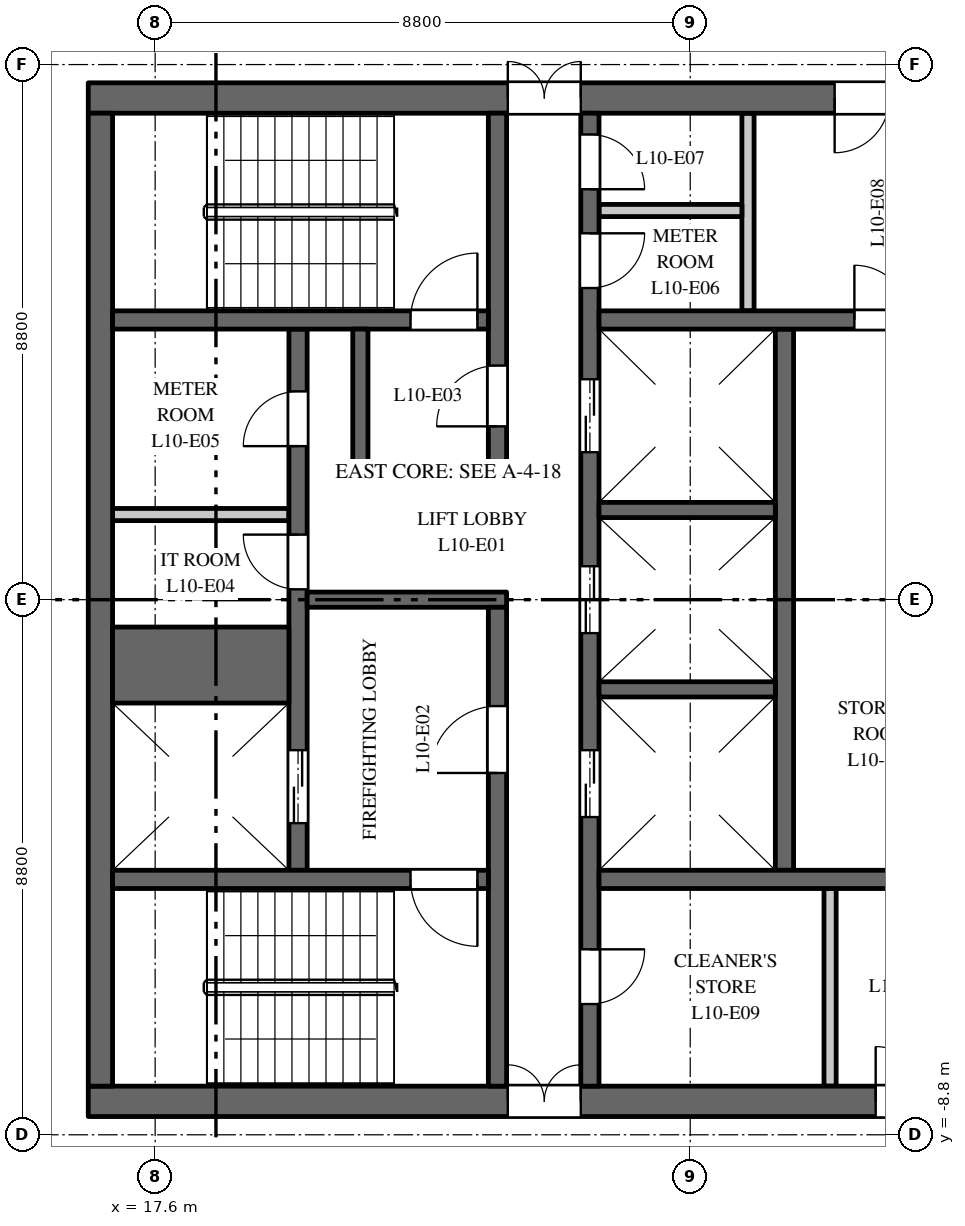
"""IFC4 building model, lengths in metres.
Left out: names, types, materials, properties, quantities, classifications, styles, units other than length and angle.
Written with IfcOpenShell. Run it as: python <this file> out.ifc"""

import sys

from ifc_helpers import new_model, si_unit, direction, frame, frame_2d, origin, place, context, subcontext, project, spatial, rectangle, extrude, element, fill, save


model = new_model("IFC4")
c1 = context("Model", 3, precision=1e-05, world=origin(), true_north=direction((0.0, 1.0)))
c2 = subcontext(c1, "Body", "Model", "MODEL_VIEW")
j1 = project(units=[si_unit("LENGTHUNIT", "METRE"), si_unit("PLANEANGLEUNIT", "RADIAN")], contexts=[c1])
p1 = place(None, origin())
s1 = spatial("IfcSite", under=j1, at=p1, CompositionType="ELEMENT")
p2 = place(p1, origin())
s2 = spatial("IfcBuilding", under=s1, at=p2, CompositionType="ELEMENT")
p3 = place(p2, frame((0.0, 0.0, 50.5)))
s3 = spatial("IfcBuildingStorey", under=s2, at=p3, CompositionType="ELEMENT", Elevation=50.5)
p4 = place(p3, frame((16.5, 8.25, 0.0), z_axis=(0.0, 0.0, 1.0), x_axis=(1.0, 0.0, 0.0)))
e1 = element("IfcWall", 1, at=p4, inside=s3, PredefinedType="SHEAR", context=c2, shape_type="SweptSolid", body=[
    extrude(rectangle(XDim=15.0, YDim=0.5, at=frame_2d((7.5, 0.0))), origin(), (0.0, 0.0, 1.0), 3.7),
])
p5 = place(p4, frame((6.9, 0.0, 0.0)))
e2 = element("IfcOpeningElement", 2, at=p5, cuts=e1, PredefinedType="OPENING", context=c2, shape_type="SweptSolid", body=[
    extrude(rectangle(XDim=1.2, YDim=2.1, at=frame_2d((0.6, 1.05))), frame((0.0, 0.26, 0.0), z_axis=(0.0, -1.0, 0.0), x_axis=(1.0, 0.0, 0.0)), (0.0, 0.0, 1.0), 0.52),
])
p6 = place(p4, frame((12.275, 0.0, 0.0)))
e3 = element("IfcOpeningElement", 3, at=p6, cuts=e1, PredefinedType="OPENING", context=c2, shape_type="SweptSolid", body=[
    extrude(rectangle(XDim=0.9, YDim=2.1, at=frame_2d((0.45, 1.05))), frame((0.0, 0.26, 0.0), z_axis=(0.0, -1.0, 0.0), x_axis=(1.0, 0.0, 0.0)), (0.0, 0.0, 1.0), 0.52),
])
p7 = place(p3, frame((16.5, -8.25, 0.0), z_axis=(0.0, 0.0, 1.0), x_axis=(1.0, 0.0, 0.0)))
e4 = element("IfcWall", 4, at=p7, inside=s3, PredefinedType="SHEAR", context=c2, shape_type="SweptSolid", body=[
    extrude(rectangle(XDim=15.0, YDim=0.5, at=frame_2d((7.5, 0.0))), origin(), (0.0, 0.0, 1.0), 3.7),
])
p8 = place(p7, frame((6.9, 0.0, 0.0)))
e5 = element("IfcOpeningElement", 5, at=p8, cuts=e4, PredefinedType="OPENING", context=c2, shape_type="SweptSolid", body=[
    extrude(rectangle(XDim=1.2, YDim=2.1, at=frame_2d((0.6, 1.05))), frame((0.0, 0.26, 0.0), z_axis=(0.0, -1.0, 0.0), x_axis=(1.0, 0.0, 0.0)), (0.0, 0.0, 1.0), 0.52),
])
p9 = place(p7, frame((12.95, 0.0, 0.0)))
e6 = element("IfcOpeningElement", 6, at=p9, cuts=e4, PredefinedType="OPENING", context=c2, shape_type="SweptSolid", body=[
    extrude(rectangle(XDim=0.9, YDim=2.1, at=frame_2d((0.45, 1.05))), frame((0.0, 0.26, 0.0), z_axis=(0.0, -1.0, 0.0), x_axis=(1.0, 0.0, 0.0)), (0.0, 0.0, 1.0), 0.52),
])
p10 = place(p3, frame((16.9, 1.4, 0.0), z_axis=(0.0, 0.0, 1.0), x_axis=(1.0, 0.0, 0.0)))
e7 = element("IfcWall", 7, at=p10, inside=s3, PredefinedType="PARTITIONING", context=c2, shape_type="SweptSolid", body=[
    extrude(rectangle(XDim=2.9, YDim=0.2, at=frame_2d((1.45, 0.0))), origin(), (0.0, 0.0, 1.0), 3.7),
])
p11 = place(p3, frame((27.95, -4.45, 0.0), z_axis=(0.0, 0.0, 1.0), x_axis=(0.0, 1.0, 0.0)))
e8 = element("IfcWall", 8, at=p11, inside=s3, PredefinedType="SHEAR", context=c2, shape_type="SweptSolid", body=[
    extrude(rectangle(XDim=8.9, YDim=0.3, at=frame_2d((4.45, 0.0))), origin(), (0.0, 0.0, 1.0), 3.7),
])
p12 = place(p3, frame((19.95, -4.45, 0.0), z_axis=(0.0, 0.0, 1.0), x_axis=(0.0, 1.0, 0.0)))
e9 = element("IfcWall", 9, at=p12, inside=s3, PredefinedType="SHEAR", context=c2, shape_type="SweptSolid", body=[
    extrude(rectangle(XDim=8.9, YDim=0.3, at=frame_2d((4.45, 0.0))), origin(), (0.0, 0.0, 1.0), 3.7),
])
p13 = place(p12, frame((0.775, 0.0, 0.0)))
e10 = element("IfcOpeningElement", 10, at=p13, cuts=e9, PredefinedType="OPENING", context=c2, shape_type="SweptSolid", body=[
    extrude(rectangle(XDim=1.2, YDim=2.1, at=frame_2d((0.6, 1.05))), frame((0.0, 0.16, 0.0), z_axis=(0.0, -1.0, 0.0), x_axis=(1.0, 0.0, 0.0)), (0.0, 0.0, 1.0), 0.32),
])
p14 = place(p12, frame((4.62, 0.0, 0.0)))
e11 = element("IfcOpeningElement", 11, at=p14, cuts=e9, PredefinedType="OPENING", context=c2, shape_type="SweptSolid", body=[
    extrude(rectangle(XDim=0.9, YDim=2.1, at=frame_2d((0.45, 1.05))), frame((0.0, 0.16, 0.0), z_axis=(0.0, -1.0, 0.0), x_axis=(1.0, 0.0, 0.0)), (0.0, 0.0, 1.0), 0.32),
])
p15 = place(p12, frame((6.975, 0.0, 0.0)))
e12 = element("IfcOpeningElement", 12, at=p15, cuts=e9, PredefinedType="OPENING", context=c2, shape_type="SweptSolid", body=[
    extrude(rectangle(XDim=0.9, YDim=2.1, at=frame_2d((0.45, 1.05))), frame((0.0, 0.16, 0.0), z_axis=(0.0, -1.0, 0.0), x_axis=(1.0, 0.0, 0.0)), (0.0, 0.0, 1.0), 0.32),
])
p16 = place(p3, frame((24.75, -8.0, 0.0), z_axis=(0.0, 0.0, 1.0), x_axis=(0.0, 1.0, 0.0)))
e13 = element("IfcWall", 13, at=p16, inside=s3, PredefinedType="SHEAR", context=c2, shape_type="SweptSolid", body=[
    extrude(rectangle(XDim=16.0, YDim=0.3, at=frame_2d((8.0, 0.0))), origin(), (0.0, 0.0, 1.0), 3.7),
])
p17 = place(p16, frame((4.425, 0.0, 0.0)))
e14 = element("IfcOpeningElement", 14, at=p17, cuts=e13, PredefinedType="OPENING", context=c2, shape_type="SweptSolid", body=[
    extrude(rectangle(XDim=1.1, YDim=2.1, at=frame_2d((0.55, 1.05))), frame((0.0, 0.16, 0.0), z_axis=(0.0, -1.0, 0.0), x_axis=(1.0, 0.0, 0.0)), (0.0, 0.0, 1.0), 0.32),
])
p18 = place(p16, frame((7.45, 0.0, 0.0)))
e15 = element("IfcOpeningElement", 15, at=p18, cuts=e13, PredefinedType="OPENING", context=c2, shape_type="SweptSolid", body=[
    extrude(rectangle(XDim=1.1, YDim=2.1, at=frame_2d((0.55, 1.05))), frame((0.0, 0.16, 0.0), z_axis=(0.0, -1.0, 0.0), x_axis=(1.0, 0.0, 0.0)), (0.0, 0.0, 1.0), 0.32),
])
p19 = place(p16, frame((10.425, 0.0, 0.0)))
e16 = element("IfcOpeningElement", 16, at=p19, cuts=e13, PredefinedType="OPENING", context=c2, shape_type="SweptSolid", body=[
    extrude(rectangle(XDim=1.2, YDim=2.1, at=frame_2d((0.6, 1.05))), frame((0.0, 0.16, 0.0), z_axis=(0.0, -1.0, 0.0), x_axis=(1.0, 0.0, 0.0)), (0.0, 0.0, 1.0), 0.32),
])
p20 = place(p16, frame((13.125, 0.0, 0.0)))
e17 = element("IfcOpeningElement", 17, at=p20, cuts=e13, PredefinedType="OPENING", context=c2, shape_type="SweptSolid", body=[
    extrude(rectangle(XDim=0.9, YDim=2.1, at=frame_2d((0.45, 1.05))), frame((0.0, 0.16, 0.0), z_axis=(0.0, -1.0, 0.0), x_axis=(1.0, 0.0, 0.0)), (0.0, 0.0, 1.0), 0.32),
])
p21 = place(p16, frame((14.75, 0.0, 0.0)))
e18 = element("IfcOpeningElement", 18, at=p21, cuts=e13, PredefinedType="OPENING", context=c2, shape_type="SweptSolid", body=[
    extrude(rectangle(XDim=0.9, YDim=2.1, at=frame_2d((0.45, 1.05))), frame((0.0, 0.16, 0.0), z_axis=(0.0, -1.0, 0.0), x_axis=(1.0, 0.0, 0.0)), (0.0, 0.0, 1.0), 0.32),
])
p22 = place(p16, frame((1.35, 0.0, 0.0)))
e19 = element("IfcOpeningElement", 19, at=p22, cuts=e13, PredefinedType="OPENING", context=c2, shape_type="SweptSolid", body=[
    extrude(rectangle(XDim=0.9, YDim=2.1, at=frame_2d((0.45, 1.05))), frame((0.0, 0.16, 0.0), z_axis=(0.0, -1.0, 0.0), x_axis=(1.0, 0.0, 0.0)), (0.0, 0.0, 1.0), 0.32),
])
p23 = place(p3, frame((20.1, 0.0, 0.0), z_axis=(0.0, 0.0, 1.0), x_axis=(1.0, 0.0, 0.0)))
e20 = element("IfcWall", 20, at=p23, inside=s3, PredefinedType="SHEAR", context=c2, shape_type="SweptSolid", body=[
    extrude(rectangle(XDim=3.28, YDim=0.25, at=frame_2d((1.64, 0.0))), origin(), (0.0, 0.0, 1.0), 3.7),
])
p24 = place(p3, frame((16.7, -8.0, 0.0), z_axis=(0.0, 0.0, 1.0), x_axis=(0.0, 1.0, 0.0)))
e21 = element("IfcWall", 21, at=p24, inside=s3, PredefinedType="SHEAR", context=c2, shape_type="SweptSolid", body=[
    extrude(rectangle(XDim=16.0, YDim=0.4, at=frame_2d((8.0, 0.0))), origin(), (0.0, 0.0, 1.0), 3.7),
])
p25 = place(p3, frame((24.9, 4.6, 0.0), z_axis=(0.0, 0.0, 1.0), x_axis=(1.0, 0.0, 0.0)))
e22 = element("IfcWall", 22, at=p25, inside=s3, PredefinedType="SHEAR", context=c2, shape_type="SweptSolid", body=[
    extrude(rectangle(XDim=6.1, YDim=0.3, at=frame_2d((3.05, 0.0))), origin(), (0.0, 0.0, 1.0), 3.7),
])
p26 = place(p25, frame((4.2, 0.0, 0.0)))
e23 = element("IfcOpeningElement", 23, at=p26, cuts=e22, PredefinedType="OPENING", context=c2, shape_type="SweptSolid", body=[
    extrude(rectangle(XDim=0.9, YDim=2.1, at=frame_2d((0.45, 1.05))), frame((0.0, 0.16, 0.0), z_axis=(0.0, -1.0, 0.0), x_axis=(1.0, 0.0, 0.0)), (0.0, 0.0, 1.0), 0.32),
])
for number, where, z_axis, x_axis in (
    (24, (27.35, 4.75, 0.0), (0.0, 0.0, 1.0), (0.0, 1.0, 0.0)),
    (25, (28.7, -8.0, 0.0), (0.0, 0.0, 1.0), (0.0, 1.0, 0.0)),
):
    element("IfcWall", number, at=place(p3, frame(where, z_axis=z_axis, x_axis=x_axis)), inside=s3, PredefinedType="PARTITIONING", context=c2, shape_type="SweptSolid", body=[
        extrude(rectangle(XDim=3.25, YDim=0.2, at=frame_2d((1.625, 0.0))), origin(), (0.0, 0.0, 1.0), 3.7),
    ])
p27 = place(p3, frame((24.9, 6.4, 0.0), z_axis=(0.0, 0.0, 1.0), x_axis=(1.0, 0.0, 0.0)))
e26 = element("IfcWall", 26, at=p27, inside=s3, PredefinedType="PARTITIONING", context=c2, shape_type="SweptSolid", body=[
    extrude(rectangle(XDim=2.35, YDim=0.2, at=frame_2d((1.175, 0.0))), origin(), (0.0, 0.0, 1.0), 3.7),
])
p28 = place(p3, frame((24.9, -4.6, 0.0), z_axis=(0.0, 0.0, 1.0), x_axis=(1.0, 0.0, 0.0)))
e27 = element("IfcWall", 27, at=p28, inside=s3, PredefinedType="SHEAR", context=c2, shape_type="SweptSolid", body=[
    extrude(rectangle(XDim=6.1, YDim=0.3, at=frame_2d((3.05, 0.0))), origin(), (0.0, 0.0, 1.0), 3.7),
])
p29 = place(p3, frame((16.9, -1.075, 0.0), z_axis=(0.0, 0.0, 1.0), x_axis=(1.0, 0.0, 0.0)))
e28 = element("IfcWall", 28, at=p29, inside=s3, PredefinedType="SHEAR", context=c2, shape_type="SweptSolid", body=[
    extrude(rectangle(XDim=2.9, YDim=1.25, at=frame_2d((1.45, 0.0))), origin(), (0.0, 0.0, 1.0), 3.7),
])
for number, where, z_axis, x_axis in (
    (29, (24.9, -1.475, 0.0), (0.0, 0.0, 1.0), (1.0, 0.0, 0.0)),
    (30, (24.9, 1.475, 0.0), (0.0, 0.0, 1.0), (1.0, 0.0, 0.0)),
):
    element("IfcWall", number, at=place(p3, frame(where, z_axis=z_axis, x_axis=x_axis)), inside=s3, PredefinedType="SHEAR", context=c2, shape_type="SweptSolid", body=[
        extrude(rectangle(XDim=2.9, YDim=0.25, at=frame_2d((1.45, 0.0))), origin(), (0.0, 0.0, 1.0), 3.7),
    ])
p30 = place(p3, frame((23.23, 2.25, 0.0), z_axis=(0.0, 0.0, 1.0), x_axis=(0.0, 1.0, 0.0)))
e31 = element("IfcWall", 31, at=p30, inside=s3, PredefinedType="SHEAR", context=c2, shape_type="SweptSolid", body=[
    extrude(rectangle(XDim=5.75, YDim=0.3, at=frame_2d((2.875, 0.0))), origin(), (0.0, 0.0, 1.0), 3.7),
])
p31 = place(p30, frame((0.6, 0.0, 0.0)))
e32 = element("IfcOpeningElement", 32, at=p31, cuts=e31, PredefinedType="OPENING", context=c2, shape_type="SweptSolid", body=[
    extrude(rectangle(XDim=1.0, YDim=2.1, at=frame_2d((0.5, 1.05))), frame((0.0, 0.16, 0.0), z_axis=(0.0, -1.0, 0.0), x_axis=(1.0, 0.0, 0.0)), (0.0, 0.0, 1.0), 0.32),
])
p32 = place(p3, frame((23.23, -8.0, 0.0), z_axis=(0.0, 0.0, 1.0), x_axis=(0.0, 1.0, 0.0)))
e33 = element("IfcWall", 33, at=p32, inside=s3, PredefinedType="SHEAR", context=c2, shape_type="SweptSolid", body=[
    extrude(rectangle(XDim=7.875, YDim=0.3, at=frame_2d((3.938, 0.0))), origin(), (0.0, 0.0, 1.0), 3.7),
])
p33 = place(p32, frame((5.15, 0.0, 0.0)))
e34 = element("IfcOpeningElement", 34, at=p33, cuts=e33, PredefinedType="OPENING", context=c2, shape_type="SweptSolid", body=[
    extrude(rectangle(XDim=1.1, YDim=2.1, at=frame_2d((0.55, 1.05))), frame((0.0, 0.16, 0.0), z_axis=(0.0, -1.0, 0.0), x_axis=(1.0, 0.0, 0.0)), (0.0, 0.0, 1.0), 0.32),
])
p34 = place(p3, frame((16.9, 4.6, 0.0), z_axis=(0.0, 0.0, 1.0), x_axis=(1.0, 0.0, 0.0)))
e35 = element("IfcWall", 35, at=p34, inside=s3, PredefinedType="SHEAR", context=c2, shape_type="SweptSolid", body=[
    extrude(rectangle(XDim=6.18, YDim=0.3, at=frame_2d((3.09, 0.0))), origin(), (0.0, 0.0, 1.0), 3.7),
])
p35 = place(p34, frame((4.9, 0.0, 0.0)))
e36 = element("IfcOpeningElement", 36, at=p35, cuts=e35, PredefinedType="OPENING", context=c2, shape_type="SweptSolid", body=[
    extrude(rectangle(XDim=1.1, YDim=2.1, at=frame_2d((0.55, 1.05))), frame((0.0, 0.16, 0.0), z_axis=(0.0, -1.0, 0.0), x_axis=(1.0, 0.0, 0.0)), (0.0, 0.0, 1.0), 0.32),
])
p36 = place(p3, frame((16.9, -4.6, 0.0), z_axis=(0.0, 0.0, 1.0), x_axis=(1.0, 0.0, 0.0)))
e37 = element("IfcWall", 37, at=p36, inside=s3, PredefinedType="SHEAR", context=c2, shape_type="SweptSolid", body=[
    extrude(rectangle(XDim=6.18, YDim=0.3, at=frame_2d((3.09, 0.0))), origin(), (0.0, 0.0, 1.0), 3.7),
])
p37 = place(p36, frame((4.9, 0.0, 0.0)))
e38 = element("IfcOpeningElement", 38, at=p37, cuts=e37, PredefinedType="OPENING", context=c2, shape_type="SweptSolid", body=[
    extrude(rectangle(XDim=1.1, YDim=2.1, at=frame_2d((0.55, 1.05))), frame((0.0, 0.16, 0.0), z_axis=(0.0, -1.0, 0.0), x_axis=(1.0, 0.0, 0.0)), (0.0, 0.0, 1.0), 0.32),
])
p38 = place(p3, frame((20.85, 2.125, 0.0), z_axis=(0.0, 0.0, 1.0), x_axis=(1.0, 0.0, 0.0)))
e39 = element("IfcWall", 39, at=p38, inside=s3, PredefinedType="SHEAR", context=c2, shape_type="SweptSolid", body=[
    extrude(rectangle(XDim=2.53, YDim=0.25, at=frame_2d((1.265, 0.0))), origin(), (0.0, 0.0, 1.0), 3.7),
])
p39 = place(p3, frame((20.975, 2.25, 0.0), z_axis=(0.0, 0.0, 1.0), x_axis=(0.0, 1.0, 0.0)))
e40 = element("IfcWall", 40, at=p39, inside=s3, PredefinedType="SHEAR", context=c2, shape_type="SweptSolid", body=[
    extrude(rectangle(XDim=2.2, YDim=0.25, at=frame_2d((1.1, 0.0))), origin(), (0.0, 0.0, 1.0), 3.7),
])
p40 = place(p13, origin())
e41 = element("IfcDoor", 41, at=p40, inside=s3, OperationType="DOUBLE_DOOR_SLIDING", PredefinedType="DOOR", context=c2, shape_type="SweptSolid", body=[
    extrude(rectangle(XDim=1.2, YDim=2.1, at=frame_2d((0.6, 1.05))), frame((0.0, 0.025, 0.0), z_axis=(0.0, -1.0, 0.0), x_axis=(1.0, 0.0, 0.0)), (0.0, 0.0, 1.0), 0.05),
])
fill(e10, e41)
p41 = place(p17, origin())
e42 = element("IfcDoor", 42, at=p41, inside=s3, OperationType="DOUBLE_DOOR_SLIDING", PredefinedType="DOOR", context=c2, shape_type="SweptSolid", body=[
    extrude(rectangle(XDim=1.1, YDim=2.1, at=frame_2d((0.55, 1.05))), frame((0.0, 0.025, 0.0), z_axis=(0.0, -1.0, 0.0), x_axis=(1.0, 0.0, 0.0)), (0.0, 0.0, 1.0), 0.05),
])
fill(e14, e42)
p42 = place(p18, origin())
e43 = element("IfcDoor", 43, at=p42, inside=s3, OperationType="DOUBLE_DOOR_SLIDING", PredefinedType="DOOR", context=c2, shape_type="SweptSolid", body=[
    extrude(rectangle(XDim=1.1, YDim=2.1, at=frame_2d((0.55, 1.05))), frame((0.0, 0.025, 0.0), z_axis=(0.0, -1.0, 0.0), x_axis=(1.0, 0.0, 0.0)), (0.0, 0.0, 1.0), 0.05),
])
fill(e15, e43)
p43 = place(p19, origin())
e44 = element("IfcDoor", 44, at=p43, inside=s3, OperationType="DOUBLE_DOOR_SLIDING", PredefinedType="DOOR", context=c2, shape_type="SweptSolid", body=[
    extrude(rectangle(XDim=1.2, YDim=2.1, at=frame_2d((0.6, 1.05))), frame((0.0, 0.025, 0.0), z_axis=(0.0, -1.0, 0.0), x_axis=(1.0, 0.0, 0.0)), (0.0, 0.0, 1.0), 0.05),
])
fill(e16, e44)
p44 = place(p35, origin())
e45 = element("IfcDoor", 45, at=p44, inside=s3, OperationType="SINGLE_SWING_LEFT", PredefinedType="DOOR", context=c2, shape_type="SweptSolid", body=[
    extrude(rectangle(XDim=1.1, YDim=2.1, at=frame_2d((0.55, 1.05))), frame((0.0, 0.025, 0.0), z_axis=(0.0, -1.0, 0.0), x_axis=(1.0, 0.0, 0.0)), (0.0, 0.0, 1.0), 0.05),
])
fill(e36, e45)
p45 = place(p37, origin())
e46 = element("IfcDoor", 46, at=p45, inside=s3, OperationType="SINGLE_SWING_RIGHT", PredefinedType="DOOR", context=c2, shape_type="SweptSolid", body=[
    extrude(rectangle(XDim=1.1, YDim=2.1, at=frame_2d((0.55, 1.05))), frame((0.0, 0.025, 0.0), z_axis=(0.0, -1.0, 0.0), x_axis=(1.0, 0.0, 0.0)), (0.0, 0.0, 1.0), 0.05),
])
fill(e38, e46)
p46 = place(p33, origin())
e47 = element("IfcDoor", 47, at=p46, inside=s3, OperationType="SINGLE_SWING_RIGHT", PredefinedType="DOOR", context=c2, shape_type="SweptSolid", body=[
    extrude(rectangle(XDim=1.1, YDim=2.1, at=frame_2d((0.55, 1.05))), frame((0.0, 0.025, 0.0), z_axis=(0.0, -1.0, 0.0), x_axis=(1.0, 0.0, 0.0)), (0.0, 0.0, 1.0), 0.05),
])
fill(e34, e47)
p47 = place(p31, origin())
e48 = element("IfcDoor", 48, at=p47, inside=s3, OperationType="SINGLE_SWING_RIGHT", PredefinedType="DOOR", context=c2, shape_type="SweptSolid", body=[
    extrude(rectangle(XDim=1.0, YDim=2.1, at=frame_2d((0.5, 1.05))), frame((0.0, 0.025, 0.0), z_axis=(0.0, -1.0, 0.0), x_axis=(1.0, 0.0, 0.0)), (0.0, 0.0, 1.0), 0.05),
])
fill(e32, e48)
p48 = place(p5, origin())
e49 = element("IfcDoor", 49, at=p48, inside=s3, OperationType="DOUBLE_DOOR_DOUBLE_SWING", PredefinedType="DOOR", context=c2, shape_type="SweptSolid", body=[
    extrude(rectangle(XDim=1.2, YDim=2.1, at=frame_2d((0.6, 1.05))), frame((0.0, 0.025, 0.0), z_axis=(0.0, -1.0, 0.0), x_axis=(1.0, 0.0, 0.0)), (0.0, 0.0, 1.0), 0.05),
])
fill(e2, e49)
p49 = place(p8, origin())
e50 = element("IfcDoor", 50, at=p49, inside=s3, OperationType="DOUBLE_DOOR_DOUBLE_SWING", PredefinedType="DOOR", context=c2, shape_type="SweptSolid", body=[
    extrude(rectangle(XDim=1.2, YDim=2.1, at=frame_2d((0.6, 1.05))), frame((0.0, 0.025, 0.0), z_axis=(0.0, -1.0, 0.0), x_axis=(1.0, 0.0, 0.0)), (0.0, 0.0, 1.0), 0.05),
])
fill(e5, e50)
p50 = place(p14, origin())
e51 = element("IfcDoor", 51, at=p50, inside=s3, OperationType="SINGLE_SWING_LEFT", PredefinedType="DOOR", context=c2, shape_type="SweptSolid", body=[
    extrude(rectangle(XDim=0.9, YDim=2.1, at=frame_2d((0.45, 1.05))), frame((0.0, 0.025, 0.0), z_axis=(0.0, -1.0, 0.0), x_axis=(1.0, 0.0, 0.0)), (0.0, 0.0, 1.0), 0.05),
])
fill(e11, e51)
p51 = place(p15, origin())
e52 = element("IfcDoor", 52, at=p51, inside=s3, OperationType="SINGLE_SWING_RIGHT", PredefinedType="DOOR", context=c2, shape_type="SweptSolid", body=[
    extrude(rectangle(XDim=0.9, YDim=2.1, at=frame_2d((0.45, 1.05))), frame((0.0, 0.025, 0.0), z_axis=(0.0, -1.0, 0.0), x_axis=(1.0, 0.0, 0.0)), (0.0, 0.0, 1.0), 0.05),
])
fill(e12, e52)
p52 = place(p20, origin())
e53 = element("IfcDoor", 53, at=p52, inside=s3, OperationType="SINGLE_SWING_RIGHT", PredefinedType="DOOR", context=c2, shape_type="SweptSolid", body=[
    extrude(rectangle(XDim=0.9, YDim=2.1, at=frame_2d((0.45, 1.05))), frame((0.0, 0.025, 0.0), z_axis=(0.0, -1.0, 0.0), x_axis=(1.0, 0.0, 0.0)), (0.0, 0.0, 1.0), 0.05),
])
fill(e17, e53)
p53 = place(p21, origin())
e54 = element("IfcDoor", 54, at=p53, inside=s3, OperationType="SINGLE_SWING_LEFT", PredefinedType="DOOR", context=c2, shape_type="SweptSolid", body=[
    extrude(rectangle(XDim=0.9, YDim=2.1, at=frame_2d((0.45, 1.05))), frame((0.0, 0.025, 0.0), z_axis=(0.0, -1.0, 0.0), x_axis=(1.0, 0.0, 0.0)), (0.0, 0.0, 1.0), 0.05),
])
fill(e18, e54)
p54 = place(p6, origin())
e55 = element("IfcDoor", 55, at=p54, inside=s3, OperationType="SINGLE_SWING_LEFT", PredefinedType="DOOR", context=c2, shape_type="SweptSolid", body=[
    extrude(rectangle(XDim=0.9, YDim=2.1, at=frame_2d((0.45, 1.05))), frame((0.0, 0.025, 0.0), z_axis=(0.0, -1.0, 0.0), x_axis=(1.0, 0.0, 0.0)), (0.0, 0.0, 1.0), 0.05),
])
fill(e3, e55)
p55 = place(p22, origin())
e56 = element("IfcDoor", 56, at=p55, inside=s3, OperationType="SINGLE_SWING_RIGHT", PredefinedType="DOOR", context=c2, shape_type="SweptSolid", body=[
    extrude(rectangle(XDim=0.9, YDim=2.1, at=frame_2d((0.45, 1.05))), frame((0.0, 0.025, 0.0), z_axis=(0.0, -1.0, 0.0), x_axis=(1.0, 0.0, 0.0)), (0.0, 0.0, 1.0), 0.05),
])
fill(e19, e56)
p56 = place(p9, origin())
e57 = element("IfcDoor", 57, at=p56, inside=s3, OperationType="SINGLE_SWING_RIGHT", PredefinedType="DOOR", context=c2, shape_type="SweptSolid", body=[
    extrude(rectangle(XDim=0.9, YDim=2.1, at=frame_2d((0.45, 1.05))), frame((0.0, 0.025, 0.0), z_axis=(0.0, -1.0, 0.0), x_axis=(1.0, 0.0, 0.0)), (0.0, 0.0, 1.0), 0.05),
])
fill(e6, e57)
p57 = place(p26, origin())
e58 = element("IfcDoor", 58, at=p57, inside=s3, OperationType="SINGLE_SWING_RIGHT", PredefinedType="DOOR", context=c2, shape_type="SweptSolid", body=[
    extrude(rectangle(XDim=0.9, YDim=2.1, at=frame_2d((0.45, 1.05))), frame((0.0, 0.025, 0.0), z_axis=(0.0, -1.0, 0.0), x_axis=(1.0, 0.0, 0.0)), (0.0, 0.0, 1.0), 0.05),
])
fill(e23, e58)
save(model, sys.argv[1])
